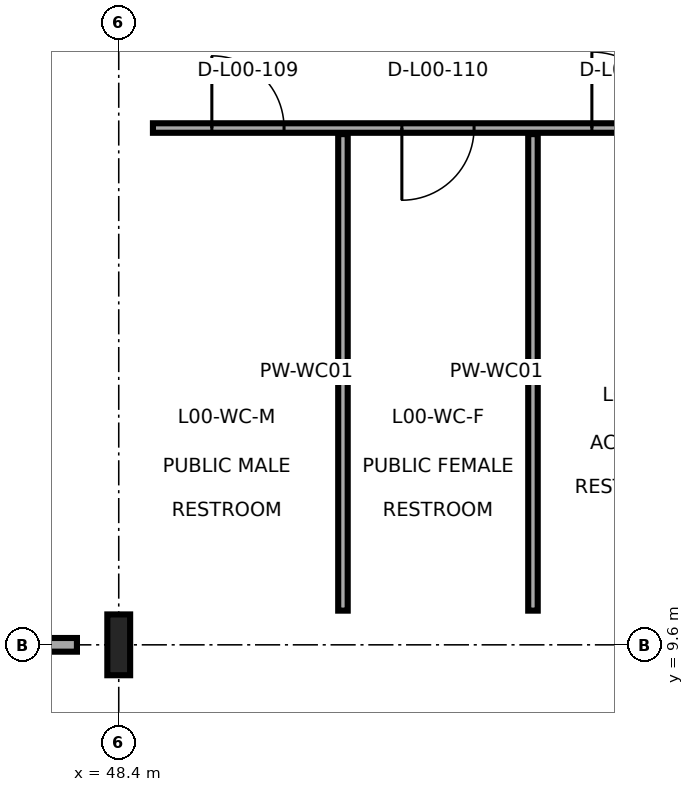
"""IFC4 building model, lengths in metres.
Left out: names, types, materials, properties, quantities, classifications, styles, units other than length and angle.
Written with IfcOpenShell. Run it as: python <this file> out.ifc"""

import sys

from ifc_helpers import new_model, si_unit, direction, frame, frame_2d, origin, origin_2d, place, context, subcontext, project, spatial, rectangle, i_section, extrude, element, fill, save


model = new_model("IFC4")
c1 = context("Model", 3, precision=1e-05, world=origin(), true_north=direction((0.0, 1.0)))
c2 = subcontext(c1, "Body", "Model", "MODEL_VIEW")
j1 = project(units=[si_unit("LENGTHUNIT", "METRE"), si_unit("PLANEANGLEUNIT", "RADIAN")], contexts=[c1])
p1 = place(None, origin())
s1 = spatial("IfcSite", under=j1, at=p1, CompositionType="ELEMENT")
p2 = place(p1, origin())
s2 = spatial("IfcBuilding", under=s1, at=p2, CompositionType="ELEMENT")
p3 = place(p2, origin())
s3 = spatial("IfcBuildingStorey", under=s2, at=p3, CompositionType="ELEMENT", Elevation=0.0)
p4 = place(p3, frame((48.4, 9.6, 0.0), z_axis=(0.0, 0.0, 1.0), x_axis=(1.0, 0.0, 0.0)))
e1 = element("IfcColumn", 1, at=p4, inside=s3, PredefinedType="COLUMN", context=c2, shape_type="SweptSolid", body=[
    extrude(i_section(OverallWidth=0.3, OverallDepth=0.8, WebThickness=0.018, FlangeThickness=0.033, FilletRadius=0.03, at=origin_2d()), origin(), (0.0, 0.0, 1.0), 8.4),
])
p5 = place(p3, frame((48.85, 16.4, 0.0), z_axis=(0.0, 0.0, 1.0), x_axis=(1.0, 0.0, 0.0)))
e2 = element("IfcWall", 2, at=p5, inside=s3, PredefinedType="PARTITIONING", context=c2, shape_type="SweptSolid", body=[
    extrude(rectangle(XDim=7.5, YDim=0.125, at=frame_2d((3.75, 0.0))), origin(), (0.0, 0.0, 1.0), 7.802),
])
p6 = place(p5, frame((0.775, 0.0, 0.0)))
e3 = element("IfcOpeningElement", 3, at=p6, cuts=e2, PredefinedType="OPENING", context=c2, shape_type="SweptSolid", body=[
    extrude(rectangle(XDim=0.95, YDim=2.1, at=frame_2d((0.475, 1.05))), frame((0.0, 0.073, 0.0), z_axis=(0.0, -1.0, 0.0), x_axis=(1.0, 0.0, 0.0)), (0.0, 0.0, 1.0), 0.145),
])
p7 = place(p5, frame((3.275, 0.0, 0.0)))
e4 = element("IfcOpeningElement", 4, at=p7, cuts=e2, PredefinedType="OPENING", context=c2, shape_type="SweptSolid", body=[
    extrude(rectangle(XDim=0.95, YDim=2.1, at=frame_2d((0.475, 1.05))), frame((0.0, 0.073, 0.0), z_axis=(0.0, -1.0, 0.0), x_axis=(1.0, 0.0, 0.0)), (0.0, 0.0, 1.0), 0.145),
])
p8 = place(p5, frame((5.775, 0.0, 0.0)))
e5 = element("IfcOpeningElement", 5, at=p8, cuts=e2, PredefinedType="OPENING", context=c2, shape_type="SweptSolid", body=[
    extrude(rectangle(XDim=1.0, YDim=2.12, at=frame_2d((0.5, 1.06))), frame((0.0, 0.073, 0.0), z_axis=(0.0, -1.0, 0.0), x_axis=(1.0, 0.0, 0.0)), (0.0, 0.0, 1.0), 0.145),
])
for number, where, z_axis, x_axis in (
    (6, (51.35, 10.05, 0.0), (0.0, 0.0, 1.0), (0.0, 1.0, 0.0)),
    (7, (53.85, 10.05, 0.0), (0.0, 0.0, 1.0), (0.0, 1.0, 0.0)),
):
    element("IfcWall", number, at=place(p3, frame(where, z_axis=z_axis, x_axis=x_axis)), inside=s3, PredefinedType="PARTITIONING", context=c2, shape_type="SweptSolid", body=[
        extrude(rectangle(XDim=6.27, YDim=0.125, at=frame_2d((3.135, 0.0))), origin(), (0.0, 0.0, 1.0), 8.13),
    ])
p9 = place(p3, frame((43.65, 9.6, 0.0), z_axis=(0.0, 0.0, 1.0), x_axis=(1.0, 0.0, 0.0)))
e8 = element("IfcWall", 8, at=p9, inside=s3, PredefinedType="PARTITIONING", context=c2, shape_type="SweptSolid", body=[
    extrude(rectangle(XDim=4.2, YDim=0.18, at=frame_2d((2.1, 0.0))), origin(), (0.0, 0.0, 1.0), 7.582),
])
p10 = place(p9, frame((1.35, 0.0, 0.0)))
e9 = element("IfcOpeningElement", 9, at=p10, cuts=e8, PredefinedType="OPENING", context=c2, shape_type="SweptSolid", body=[
    extrude(rectangle(XDim=1.5, YDim=2.3, at=frame_2d((0.75, 1.15))), frame((0.0, 0.1, 0.0), z_axis=(0.0, -1.0, 0.0), x_axis=(1.0, 0.0, 0.0)), (0.0, 0.0, 1.0), 0.2),
])
p11 = place(p6, frame((0.95, 0.0, 0.0), z_axis=(0.0, 0.0, 1.0), x_axis=(-1.0, 0.0, 0.0)))
e10 = element("IfcDoor", 10, at=p11, inside=s3, OperationType="SINGLE_SWING_LEFT", PredefinedType="DOOR", context=c2, shape_type="SweptSolid", body=[
    extrude(rectangle(XDim=0.95, YDim=2.1, at=frame_2d((0.475, 1.05))), frame((0.0, 0.025, 0.0), z_axis=(0.0, -1.0, 0.0), x_axis=(1.0, 0.0, 0.0)), (0.0, 0.0, 1.0), 0.05),
])
fill(e3, e10)
p12 = place(p7, frame((0.95, 0.0, 0.0), z_axis=(0.0, 0.0, 1.0), x_axis=(-1.0, 0.0, 0.0)))
e11 = element("IfcDoor", 11, at=p12, inside=s3, OperationType="SINGLE_SWING_RIGHT", PredefinedType="DOOR", context=c2, shape_type="SweptSolid", body=[
    extrude(rectangle(XDim=0.95, YDim=2.1, at=frame_2d((0.475, 1.05))), frame((0.0, 0.025, 0.0), z_axis=(0.0, -1.0, 0.0), x_axis=(1.0, 0.0, 0.0)), (0.0, 0.0, 1.0), 0.05),
])
fill(e4, e11)
p13 = place(p8, frame((1.0, 0.0, 0.0), z_axis=(0.0, 0.0, 1.0), x_axis=(-1.0, 0.0, 0.0)))
e12 = element("IfcDoor", 12, at=p13, inside=s3, OperationType="SINGLE_SWING_LEFT", PredefinedType="DOOR", context=c2, shape_type="SweptSolid", body=[
    extrude(rectangle(XDim=1.0, YDim=2.12, at=frame_2d((0.5, 1.06))), frame((0.0, 0.025, 0.0), z_axis=(0.0, -1.0, 0.0), x_axis=(1.0, 0.0, 0.0)), (0.0, 0.0, 1.0), 0.05),
])
fill(e5, e12)
save(model, sys.argv[1])
